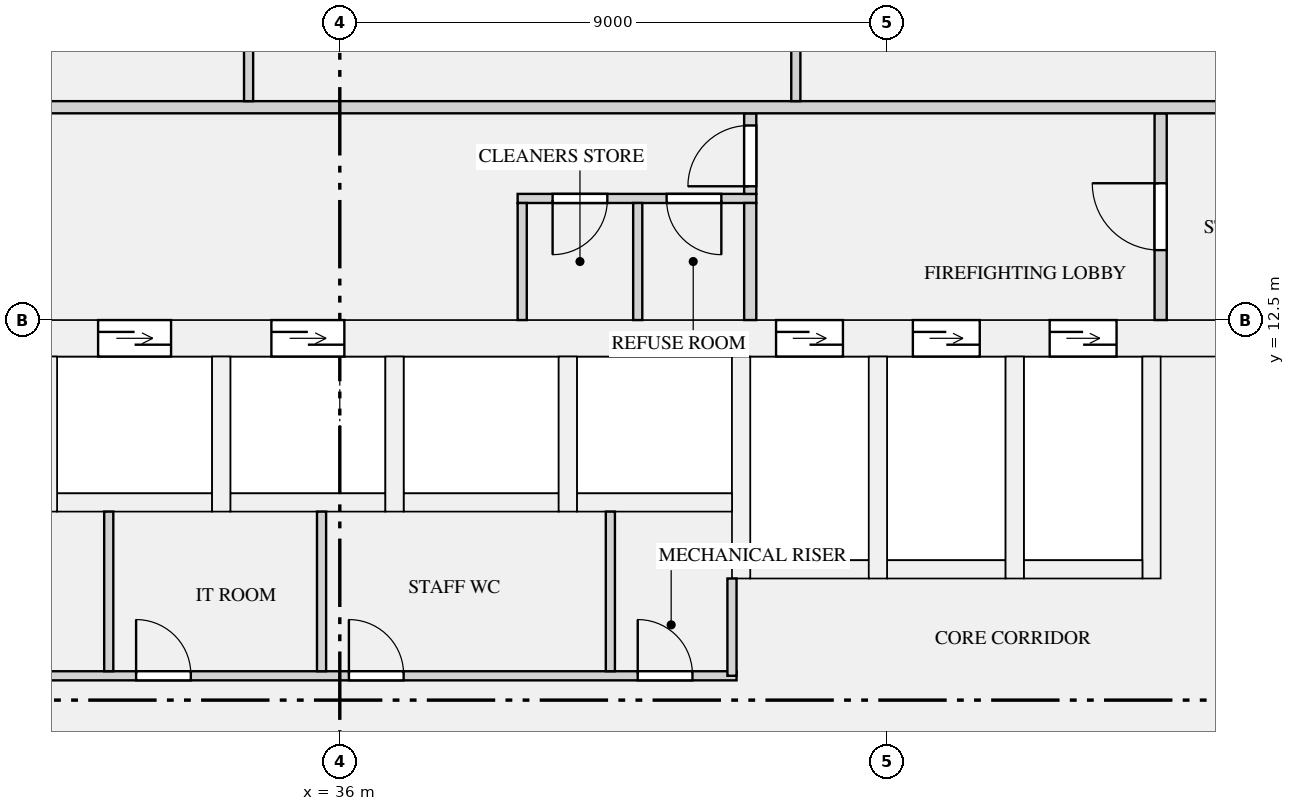
"""IFC4 building model, lengths in metres.
Left out: names, types, materials, properties, quantities, classifications, styles, units other than length and angle.
Written with IfcOpenShell. Run it as: python <this file> out.ifc"""

import sys

from ifc_helpers import new_model, si_unit, direction, frame, frame_2d, origin, place, context, subcontext, project, spatial, rectangle, extrude, element, fill, save


model = new_model("IFC4")
c1 = context("Model", 3, precision=1e-05, world=origin(), true_north=direction((0.0, 1.0)))
c2 = subcontext(c1, "Body", "Model", "MODEL_VIEW")
j1 = project(units=[si_unit("LENGTHUNIT", "METRE"), si_unit("PLANEANGLEUNIT", "RADIAN")], contexts=[c1])
p1 = place(None, origin())
s1 = spatial("IfcSite", under=j1, at=p1, CompositionType="ELEMENT")
p2 = place(p1, origin())
s2 = spatial("IfcBuilding", under=s1, at=p2, CompositionType="ELEMENT")
p3 = place(p2, frame((0.0, 0.0, 28.95)))
s3 = spatial("IfcBuildingStorey", under=s2, at=p3, CompositionType="ELEMENT", Elevation=28.95)
p4 = place(p3, frame((19.0, 12.2, 0.0), z_axis=(0.0, 0.0, 1.0), x_axis=(1.0, 0.0, 0.0)))
e1 = element("IfcWall", 1, at=p4, inside=s3, PredefinedType="SHEAR", context=c2, shape_type="SweptSolid", body=[
    extrude(rectangle(XDim=34.0, YDim=0.6, at=frame_2d((17.0, 0.0))), origin(), (0.0, 0.0, 1.0), 3.15),
])
p5 = place(p4, frame((4.475, 0.0, 0.0)))
e2 = element("IfcOpeningElement", 2, at=p5, cuts=e1, PredefinedType="OPENING", context=c2, shape_type="SweptSolid", body=[
    extrude(rectangle(XDim=1.2, YDim=2.1, at=frame_2d((0.6, 1.05))), frame((0.0, 0.31, 0.0), z_axis=(0.0, -1.0, 0.0), x_axis=(1.0, 0.0, 0.0)), (0.0, 0.0, 1.0), 0.62),
])
p6 = place(p4, frame((7.325, 0.0, 0.0)))
e3 = element("IfcOpeningElement", 3, at=p6, cuts=e1, PredefinedType="OPENING", context=c2, shape_type="SweptSolid", body=[
    extrude(rectangle(XDim=1.2, YDim=2.1, at=frame_2d((0.6, 1.05))), frame((0.0, 0.31, 0.0), z_axis=(0.0, -1.0, 0.0), x_axis=(1.0, 0.0, 0.0)), (0.0, 0.0, 1.0), 0.62),
])
p7 = place(p4, frame((10.175, 0.0, 0.0)))
e4 = element("IfcOpeningElement", 4, at=p7, cuts=e1, PredefinedType="OPENING", context=c2, shape_type="SweptSolid", body=[
    extrude(rectangle(XDim=1.2, YDim=2.1, at=frame_2d((0.6, 1.05))), frame((0.0, 0.31, 0.0), z_axis=(0.0, -1.0, 0.0), x_axis=(1.0, 0.0, 0.0)), (0.0, 0.0, 1.0), 0.62),
])
p8 = place(p4, frame((13.025, 0.0, 0.0)))
e5 = element("IfcOpeningElement", 5, at=p8, cuts=e1, PredefinedType="OPENING", context=c2, shape_type="SweptSolid", body=[
    extrude(rectangle(XDim=1.2, YDim=2.1, at=frame_2d((0.6, 1.05))), frame((0.0, 0.31, 0.0), z_axis=(0.0, -1.0, 0.0), x_axis=(1.0, 0.0, 0.0)), (0.0, 0.0, 1.0), 0.62),
])
p9 = place(p4, frame((15.875, 0.0, 0.0)))
e6 = element("IfcOpeningElement", 6, at=p9, cuts=e1, PredefinedType="OPENING", context=c2, shape_type="SweptSolid", body=[
    extrude(rectangle(XDim=1.2, YDim=2.1, at=frame_2d((0.6, 1.05))), frame((0.0, 0.31, 0.0), z_axis=(0.0, -1.0, 0.0), x_axis=(1.0, 0.0, 0.0)), (0.0, 0.0, 1.0), 0.62),
])
p10 = place(p4, frame((24.175, 0.0, 0.0)))
e7 = element("IfcOpeningElement", 7, at=p10, cuts=e1, PredefinedType="OPENING", context=c2, shape_type="SweptSolid", body=[
    extrude(rectangle(XDim=1.1, YDim=2.1, at=frame_2d((0.55, 1.05))), frame((0.0, 0.31, 0.0), z_axis=(0.0, -1.0, 0.0), x_axis=(1.0, 0.0, 0.0)), (0.0, 0.0, 1.0), 0.62),
])
p11 = place(p4, frame((26.425, 0.0, 0.0)))
e8 = element("IfcOpeningElement", 8, at=p11, cuts=e1, PredefinedType="OPENING", context=c2, shape_type="SweptSolid", body=[
    extrude(rectangle(XDim=1.1, YDim=2.1, at=frame_2d((0.55, 1.05))), frame((0.0, 0.31, 0.0), z_axis=(0.0, -1.0, 0.0), x_axis=(1.0, 0.0, 0.0)), (0.0, 0.0, 1.0), 0.62),
])
p12 = place(p4, frame((28.675, 0.0, 0.0)))
e9 = element("IfcOpeningElement", 9, at=p12, cuts=e1, PredefinedType="OPENING", context=c2, shape_type="SweptSolid", body=[
    extrude(rectangle(XDim=1.1, YDim=2.1, at=frame_2d((0.55, 1.05))), frame((0.0, 0.31, 0.0), z_axis=(0.0, -1.0, 0.0), x_axis=(1.0, 0.0, 0.0)), (0.0, 0.0, 1.0), 0.62),
])
p13 = place(p4, frame((1.15, 0.0, 0.0)))
e10 = element("IfcOpeningElement", 10, at=p13, cuts=e1, PredefinedType="OPENING", context=c2, shape_type="SweptSolid", body=[
    extrude(rectangle(XDim=1.2, YDim=2.1, at=frame_2d((0.6, 1.05))), frame((0.0, 0.31, 0.0), z_axis=(0.0, -1.0, 0.0), x_axis=(1.0, 0.0, 0.0)), (0.0, 0.0, 1.0), 0.62),
])
p14 = place(p4, frame((31.65, 0.0, 0.0)))
e11 = element("IfcOpeningElement", 11, at=p14, cuts=e1, PredefinedType="OPENING", context=c2, shape_type="SweptSolid", body=[
    extrude(rectangle(XDim=1.2, YDim=2.1, at=frame_2d((0.6, 1.05))), frame((0.0, 0.31, 0.0), z_axis=(0.0, -1.0, 0.0), x_axis=(1.0, 0.0, 0.0)), (0.0, 0.0, 1.0), 0.62),
])
for number, where, z_axis, x_axis in (
    (12, (31.35, 9.5, 0.0), (0.0, 0.0, 1.0), (1.0, 0.0, 0.0)),
    (13, (31.2, 9.35, 0.0), (0.0, 0.0, 1.0), (0.0, 1.0, 0.0)),
):
    element("IfcWall", number, at=place(p3, frame(where, z_axis=z_axis, x_axis=x_axis)), inside=s3, PredefinedType="SHEAR", context=c2, shape_type="SweptSolid", body=[
        extrude(rectangle(XDim=2.55, YDim=0.3, at=frame_2d((1.275, 0.0))), origin(), (0.0, 0.0, 1.0), 3.15),
    ])
p15 = place(p3, frame((34.2, 9.5, 0.0), z_axis=(0.0, 0.0, 1.0), x_axis=(1.0, 0.0, 0.0)))
e14 = element("IfcWall", 14, at=p15, inside=s3, PredefinedType="SHEAR", context=c2, shape_type="SweptSolid", body=[
    extrude(rectangle(XDim=2.55, YDim=0.3, at=frame_2d((1.275, 0.0))), origin(), (0.0, 0.0, 1.0), 3.15),
])
p16 = place(p3, frame((34.05, 9.35, 0.0), z_axis=(0.0, 0.0, 1.0), x_axis=(0.0, 1.0, 0.0)))
e15 = element("IfcWall", 15, at=p16, inside=s3, PredefinedType="SHEAR", context=c2, shape_type="SweptSolid", body=[
    extrude(rectangle(XDim=2.55, YDim=0.3, at=frame_2d((1.275, 0.0))), origin(), (0.0, 0.0, 1.0), 3.15),
])
p17 = place(p3, frame((37.05, 9.5, 0.0), z_axis=(0.0, 0.0, 1.0), x_axis=(1.0, 0.0, 0.0)))
e16 = element("IfcWall", 16, at=p17, inside=s3, PredefinedType="SHEAR", context=c2, shape_type="SweptSolid", body=[
    extrude(rectangle(XDim=2.55, YDim=0.3, at=frame_2d((1.275, 0.0))), origin(), (0.0, 0.0, 1.0), 3.15),
])
p18 = place(p3, frame((36.9, 9.35, 0.0), z_axis=(0.0, 0.0, 1.0), x_axis=(0.0, 1.0, 0.0)))
e17 = element("IfcWall", 17, at=p18, inside=s3, PredefinedType="SHEAR", context=c2, shape_type="SweptSolid", body=[
    extrude(rectangle(XDim=2.55, YDim=0.3, at=frame_2d((1.275, 0.0))), origin(), (0.0, 0.0, 1.0), 3.15),
])
p19 = place(p3, frame((39.9, 9.5, 0.0), z_axis=(0.0, 0.0, 1.0), x_axis=(1.0, 0.0, 0.0)))
e18 = element("IfcWall", 18, at=p19, inside=s3, PredefinedType="SHEAR", context=c2, shape_type="SweptSolid", body=[
    extrude(rectangle(XDim=2.55, YDim=0.3, at=frame_2d((1.275, 0.0))), origin(), (0.0, 0.0, 1.0), 3.15),
])
p20 = place(p3, frame((39.75, 9.35, 0.0), z_axis=(0.0, 0.0, 1.0), x_axis=(0.0, 1.0, 0.0)))
e19 = element("IfcWall", 19, at=p20, inside=s3, PredefinedType="SHEAR", context=c2, shape_type="SweptSolid", body=[
    extrude(rectangle(XDim=2.55, YDim=0.3, at=frame_2d((1.275, 0.0))), origin(), (0.0, 0.0, 1.0), 3.15),
])
p21 = place(p3, frame((42.75, 8.4, 0.0), z_axis=(0.0, 0.0, 1.0), x_axis=(1.0, 0.0, 0.0)))
e20 = element("IfcWall", 20, at=p21, inside=s3, PredefinedType="SHEAR", context=c2, shape_type="SweptSolid", body=[
    extrude(rectangle(XDim=1.95, YDim=0.3, at=frame_2d((0.975, 0.0))), origin(), (0.0, 0.0, 1.0), 3.15),
])
p22 = place(p3, frame((42.6, 8.25, 0.0), z_axis=(0.0, 0.0, 1.0), x_axis=(0.0, 1.0, 0.0)))
e21 = element("IfcWall", 21, at=p22, inside=s3, PredefinedType="SHEAR", context=c2, shape_type="SweptSolid", body=[
    extrude(rectangle(XDim=3.65, YDim=0.3, at=frame_2d((1.825, 0.0))), origin(), (0.0, 0.0, 1.0), 3.15),
])
p23 = place(p3, frame((45.0, 8.4, 0.0), z_axis=(0.0, 0.0, 1.0), x_axis=(1.0, 0.0, 0.0)))
e22 = element("IfcWall", 22, at=p23, inside=s3, PredefinedType="SHEAR", context=c2, shape_type="SweptSolid", body=[
    extrude(rectangle(XDim=1.95, YDim=0.3, at=frame_2d((0.975, 0.0))), origin(), (0.0, 0.0, 1.0), 3.15),
])
p24 = place(p3, frame((44.85, 8.25, 0.0), z_axis=(0.0, 0.0, 1.0), x_axis=(0.0, 1.0, 0.0)))
e23 = element("IfcWall", 23, at=p24, inside=s3, PredefinedType="SHEAR", context=c2, shape_type="SweptSolid", body=[
    extrude(rectangle(XDim=3.65, YDim=0.3, at=frame_2d((1.825, 0.0))), origin(), (0.0, 0.0, 1.0), 3.15),
])
p25 = place(p3, frame((47.25, 8.4, 0.0), z_axis=(0.0, 0.0, 1.0), x_axis=(1.0, 0.0, 0.0)))
e24 = element("IfcWall", 24, at=p25, inside=s3, PredefinedType="SHEAR", context=c2, shape_type="SweptSolid", body=[
    extrude(rectangle(XDim=1.95, YDim=0.3, at=frame_2d((0.975, 0.0))), origin(), (0.0, 0.0, 1.0), 3.15),
])
for number, where, z_axis, x_axis in (
    (25, (47.1, 8.25, 0.0), (0.0, 0.0, 1.0), (0.0, 1.0, 0.0)),
    (26, (49.35, 8.25, 0.0), (0.0, 0.0, 1.0), (0.0, 1.0, 0.0)),
):
    element("IfcWall", number, at=place(p3, frame(where, z_axis=z_axis, x_axis=x_axis)), inside=s3, PredefinedType="SHEAR", context=c2, shape_type="SweptSolid", body=[
        extrude(rectangle(XDim=3.65, YDim=0.3, at=frame_2d((1.825, 0.0))), origin(), (0.0, 0.0, 1.0), 3.15),
    ])
p26 = place(p3, frame((22.125, 6.65, 0.0), z_axis=(0.0, 0.0, 1.0), x_axis=(1.0, 0.0, 0.0)))
e27 = element("IfcWall", 27, at=p26, inside=s3, PredefinedType="PARTITIONING", context=c2, shape_type="SweptSolid", body=[
    extrude(rectangle(XDim=20.4, YDim=0.15, at=frame_2d((10.2, 0.0))), origin(), (0.0, 0.0, 1.0), 2.83),
])
p27 = place(p26, frame((0.525, 0.0, 0.0)))
e28 = element("IfcOpeningElement", 28, at=p27, cuts=e27, PredefinedType="OPENING", context=c2, shape_type="SweptSolid", body=[
    extrude(rectangle(XDim=0.9, YDim=2.1, at=frame_2d((0.45, 1.05))), frame((0.0, 0.085, 0.0), z_axis=(0.0, -1.0, 0.0), x_axis=(1.0, 0.0, 0.0)), (0.0, 0.0, 1.0), 0.17),
])
p28 = place(p26, frame((5.025, 0.0, 0.0)))
e29 = element("IfcOpeningElement", 29, at=p28, cuts=e27, PredefinedType="OPENING", context=c2, shape_type="SweptSolid", body=[
    extrude(rectangle(XDim=0.9, YDim=2.1, at=frame_2d((0.45, 1.05))), frame((0.0, 0.085, 0.0), z_axis=(0.0, -1.0, 0.0), x_axis=(1.0, 0.0, 0.0)), (0.0, 0.0, 1.0), 0.17),
])
p29 = place(p26, frame((10.525, 0.0, 0.0)))
e30 = element("IfcOpeningElement", 30, at=p29, cuts=e27, PredefinedType="OPENING", context=c2, shape_type="SweptSolid", body=[
    extrude(rectangle(XDim=0.9, YDim=2.1, at=frame_2d((0.45, 1.05))), frame((0.0, 0.085, 0.0), z_axis=(0.0, -1.0, 0.0), x_axis=(1.0, 0.0, 0.0)), (0.0, 0.0, 1.0), 0.17),
])
p30 = place(p26, frame((14.025, 0.0, 0.0)))
e31 = element("IfcOpeningElement", 31, at=p30, cuts=e27, PredefinedType="OPENING", context=c2, shape_type="SweptSolid", body=[
    extrude(rectangle(XDim=0.9, YDim=2.1, at=frame_2d((0.45, 1.05))), frame((0.0, 0.085, 0.0), z_axis=(0.0, -1.0, 0.0), x_axis=(1.0, 0.0, 0.0)), (0.0, 0.0, 1.0), 0.17),
])
p31 = place(p26, frame((18.775, 0.0, 0.0)))
e32 = element("IfcOpeningElement", 32, at=p31, cuts=e27, PredefinedType="OPENING", context=c2, shape_type="SweptSolid", body=[
    extrude(rectangle(XDim=0.9, YDim=2.1, at=frame_2d((0.45, 1.05))), frame((0.0, 0.085, 0.0), z_axis=(0.0, -1.0, 0.0), x_axis=(1.0, 0.0, 0.0)), (0.0, 0.0, 1.0), 0.17),
])
p32 = place(p3, frame((38.925, 14.5, 0.0), z_axis=(0.0, 0.0, 1.0), x_axis=(1.0, 0.0, 0.0)))
e33 = element("IfcWall", 33, at=p32, inside=s3, PredefinedType="PARTITIONING", context=c2, shape_type="SweptSolid", body=[
    extrude(rectangle(XDim=3.925, YDim=0.15, at=frame_2d((1.962, 0.0))), origin(), (0.0, 0.0, 1.0), 2.83),
])
p33 = place(p32, frame((0.575, 0.0, 0.0)))
e34 = element("IfcOpeningElement", 34, at=p33, cuts=e33, PredefinedType="OPENING", context=c2, shape_type="SweptSolid", body=[
    extrude(rectangle(XDim=0.9, YDim=2.1, at=frame_2d((0.45, 1.05))), frame((0.0, 0.085, 0.0), z_axis=(0.0, -1.0, 0.0), x_axis=(1.0, 0.0, 0.0)), (0.0, 0.0, 1.0), 0.17),
])
p34 = place(p32, frame((2.45, 0.0, 0.0)))
e35 = element("IfcOpeningElement", 35, at=p34, cuts=e33, PredefinedType="OPENING", context=c2, shape_type="SweptSolid", body=[
    extrude(rectangle(XDim=0.9, YDim=2.1, at=frame_2d((0.45, 1.05))), frame((0.0, 0.085, 0.0), z_axis=(0.0, -1.0, 0.0), x_axis=(1.0, 0.0, 0.0)), (0.0, 0.0, 1.0), 0.17),
])
p35 = place(p3, frame((42.45, 6.65, 0.0), z_axis=(0.0, 0.0, 1.0), x_axis=(0.0, 1.0, 0.0)))
e36 = element("IfcWall", 36, at=p35, inside=s3, PredefinedType="PARTITIONING", context=c2, shape_type="SweptSolid", body=[
    extrude(rectangle(XDim=1.6, YDim=0.15, at=frame_2d((0.8, 0.0))), origin(), (0.0, 0.0, 1.0), 2.83),
])
for number, where, z_axis, x_axis in (
    (37, (32.2, 6.725, 0.0), (0.0, 0.0, 1.0), (0.0, 1.0, 0.0)),
    (38, (35.7, 6.725, 0.0), (0.0, 0.0, 1.0), (0.0, 1.0, 0.0)),
    (39, (40.45, 6.725, 0.0), (0.0, 0.0, 1.0), (0.0, 1.0, 0.0)),
):
    element("IfcWall", number, at=place(p3, frame(where, z_axis=z_axis, x_axis=x_axis)), inside=s3, PredefinedType="PARTITIONING", context=c2, shape_type="SweptSolid", body=[
        extrude(rectangle(XDim=2.625, YDim=0.15, at=frame_2d((1.312, 0.0))), origin(), (0.0, 0.0, 1.0), 2.83),
    ])
for number, where, z_axis, x_axis in (
    (40, (39.0, 12.5, 0.0), (0.0, 0.0, 1.0), (0.0, 1.0, 0.0)),
    (41, (40.9, 12.5, 0.0), (0.0, 0.0, 1.0), (0.0, 1.0, 0.0)),
):
    element("IfcWall", number, at=place(p3, frame(where, z_axis=z_axis, x_axis=x_axis)), inside=s3, PredefinedType="PARTITIONING", context=c2, shape_type="SweptSolid", body=[
        extrude(rectangle(XDim=1.925, YDim=0.15, at=frame_2d((0.962, 0.0))), origin(), (0.0, 0.0, 1.0), 2.83),
    ])
p36 = place(p3, frame((42.75, 12.5, 0.0), z_axis=(0.0, 0.0, 1.0), x_axis=(0.0, 1.0, 0.0)))
e42 = element("IfcWall", 42, at=p36, inside=s3, PredefinedType="PARTITIONING", context=c2, shape_type="SweptSolid", body=[
    extrude(rectangle(XDim=1.925, YDim=0.2, at=frame_2d((0.962, 0.0))), origin(), (0.0, 0.0, 1.0), 2.83),
])
p37 = place(p3, frame((49.5, 12.5, 0.0), z_axis=(0.0, 0.0, 1.0), x_axis=(0.0, 1.0, 0.0)))
e43 = element("IfcWall", 43, at=p37, inside=s3, PredefinedType="PARTITIONING", context=c2, shape_type="SweptSolid", body=[
    extrude(rectangle(XDim=3.4, YDim=0.2, at=frame_2d((1.7, 0.0))), origin(), (0.0, 0.0, 1.0), 2.83),
])
p38 = place(p37, frame((1.15, 0.0, 0.0)))
e44 = element("IfcOpeningElement", 44, at=p38, cuts=e43, PredefinedType="OPENING", context=c2, shape_type="SweptSolid", body=[
    extrude(rectangle(XDim=1.1, YDim=2.1, at=frame_2d((0.55, 1.05))), frame((0.0, 0.11, 0.0), z_axis=(0.0, -1.0, 0.0), x_axis=(1.0, 0.0, 0.0)), (0.0, 0.0, 1.0), 0.22),
])
p39 = place(p3, frame((42.75, 14.575, 0.0), z_axis=(0.0, 0.0, 1.0), x_axis=(0.0, 1.0, 0.0)))
e45 = element("IfcWall", 45, at=p39, inside=s3, PredefinedType="PARTITIONING", context=c2, shape_type="SweptSolid", body=[
    extrude(rectangle(XDim=1.325, YDim=0.2, at=frame_2d((0.663, 0.0))), origin(), (0.0, 0.0, 1.0), 2.83),
])
p40 = place(p39, frame((0.125, 0.0, 0.0)))
e46 = element("IfcOpeningElement", 46, at=p40, cuts=e45, PredefinedType="OPENING", context=c2, shape_type="SweptSolid", body=[
    extrude(rectangle(XDim=1.0, YDim=2.1, at=frame_2d((0.5, 1.05))), frame((0.0, 0.11, 0.0), z_axis=(0.0, -1.0, 0.0), x_axis=(1.0, 0.0, 0.0)), (0.0, 0.0, 1.0), 0.22),
])
p41 = place(p3, frame((17.9, 16.0, 0.0), z_axis=(0.0, 0.0, 1.0), x_axis=(1.0, 0.0, 0.0)))
e47 = element("IfcWall", 47, at=p41, inside=s3, PredefinedType="PARTITIONING", context=c2, shape_type="SweptSolid", body=[
    extrude(rectangle(XDim=36.2, YDim=0.2, at=frame_2d((18.1, 0.0))), origin(), (0.0, 0.0, 1.0), 2.83),
])
p42 = place(p41, frame((0.9, 0.0, 0.0)))
e48 = element("IfcOpeningElement", 48, at=p42, cuts=e47, PredefinedType="OPENING", context=c2, shape_type="SweptSolid", body=[
    extrude(rectangle(XDim=1.4, YDim=2.1, at=frame_2d((0.7, 1.05))), frame((0.0, 0.11, 0.0), z_axis=(0.0, -1.0, 0.0), x_axis=(1.0, 0.0, 0.0)), (0.0, 0.0, 1.0), 0.22),
])
p43 = place(p41, frame((33.9, 0.0, 0.0)))
e49 = element("IfcOpeningElement", 49, at=p43, cuts=e47, PredefinedType="OPENING", context=c2, shape_type="SweptSolid", body=[
    extrude(rectangle(XDim=1.4, YDim=2.1, at=frame_2d((0.7, 1.05))), frame((0.0, 0.11, 0.0), z_axis=(0.0, -1.0, 0.0), x_axis=(1.0, 0.0, 0.0)), (0.0, 0.0, 1.0), 0.22),
])
for number, where, z_axis, x_axis in (
    (50, (34.5, 16.1, 0.0), (0.0, 0.0, 1.0), (0.0, 1.0, 0.0)),
    (51, (43.5, 16.1, 0.0), (0.0, 0.0, 1.0), (0.0, 1.0, 0.0)),
):
    element("IfcWall", number, at=place(p3, frame(where, z_axis=z_axis, x_axis=x_axis)), inside=s3, PredefinedType="PARTITIONING", context=c2, shape_type="SweptSolid", body=[
        extrude(rectangle(XDim=4.825, YDim=0.15, at=frame_2d((2.413, 0.0))), origin(), (0.0, 0.0, 1.0), 2.83),
    ])
p44 = place(p8, origin())
e52 = element("IfcDoor", 52, at=p44, inside=s3, OperationType="DOUBLE_DOOR_SLIDING", PredefinedType="DOOR", context=c2, shape_type="SweptSolid", body=[
    extrude(rectangle(XDim=1.2, YDim=2.1, at=frame_2d((0.6, 1.05))), frame((0.0, 0.025, 0.0), z_axis=(0.0, -1.0, 0.0), x_axis=(1.0, 0.0, 0.0)), (0.0, 0.0, 1.0), 0.05),
])
fill(e5, e52)
p45 = place(p9, origin())
e53 = element("IfcDoor", 53, at=p45, inside=s3, OperationType="DOUBLE_DOOR_SLIDING", PredefinedType="DOOR", context=c2, shape_type="SweptSolid", body=[
    extrude(rectangle(XDim=1.2, YDim=2.1, at=frame_2d((0.6, 1.05))), frame((0.0, 0.025, 0.0), z_axis=(0.0, -1.0, 0.0), x_axis=(1.0, 0.0, 0.0)), (0.0, 0.0, 1.0), 0.05),
])
fill(e6, e53)
p46 = place(p10, origin())
e54 = element("IfcDoor", 54, at=p46, inside=s3, OperationType="DOUBLE_DOOR_SLIDING", PredefinedType="DOOR", context=c2, shape_type="SweptSolid", body=[
    extrude(rectangle(XDim=1.1, YDim=2.1, at=frame_2d((0.55, 1.05))), frame((0.0, 0.025, 0.0), z_axis=(0.0, -1.0, 0.0), x_axis=(1.0, 0.0, 0.0)), (0.0, 0.0, 1.0), 0.05),
])
fill(e7, e54)
p47 = place(p11, origin())
e55 = element("IfcDoor", 55, at=p47, inside=s3, OperationType="DOUBLE_DOOR_SLIDING", PredefinedType="DOOR", context=c2, shape_type="SweptSolid", body=[
    extrude(rectangle(XDim=1.1, YDim=2.1, at=frame_2d((0.55, 1.05))), frame((0.0, 0.025, 0.0), z_axis=(0.0, -1.0, 0.0), x_axis=(1.0, 0.0, 0.0)), (0.0, 0.0, 1.0), 0.05),
])
fill(e8, e55)
p48 = place(p12, origin())
e56 = element("IfcDoor", 56, at=p48, inside=s3, OperationType="DOUBLE_DOOR_SLIDING", PredefinedType="DOOR", context=c2, shape_type="SweptSolid", body=[
    extrude(rectangle(XDim=1.1, YDim=2.1, at=frame_2d((0.55, 1.05))), frame((0.0, 0.025, 0.0), z_axis=(0.0, -1.0, 0.0), x_axis=(1.0, 0.0, 0.0)), (0.0, 0.0, 1.0), 0.05),
])
fill(e9, e56)
p49 = place(p29, origin())
e57 = element("IfcDoor", 57, at=p49, inside=s3, OperationType="SINGLE_SWING_LEFT", PredefinedType="DOOR", context=c2, shape_type="SweptSolid", body=[
    extrude(rectangle(XDim=0.9, YDim=2.1, at=frame_2d((0.45, 1.05))), frame((0.0, 0.025, 0.0), z_axis=(0.0, -1.0, 0.0), x_axis=(1.0, 0.0, 0.0)), (0.0, 0.0, 1.0), 0.05),
])
fill(e30, e57)
p50 = place(p30, origin())
e58 = element("IfcDoor", 58, at=p50, inside=s3, OperationType="SINGLE_SWING_LEFT", PredefinedType="DOOR", context=c2, shape_type="SweptSolid", body=[
    extrude(rectangle(XDim=0.9, YDim=2.1, at=frame_2d((0.45, 1.05))), frame((0.0, 0.025, 0.0), z_axis=(0.0, -1.0, 0.0), x_axis=(1.0, 0.0, 0.0)), (0.0, 0.0, 1.0), 0.05),
])
fill(e31, e58)
p51 = place(p31, origin())
e59 = element("IfcDoor", 59, at=p51, inside=s3, OperationType="SINGLE_SWING_LEFT", PredefinedType="DOOR", context=c2, shape_type="SweptSolid", body=[
    extrude(rectangle(XDim=0.9, YDim=2.1, at=frame_2d((0.45, 1.05))), frame((0.0, 0.025, 0.0), z_axis=(0.0, -1.0, 0.0), x_axis=(1.0, 0.0, 0.0)), (0.0, 0.0, 1.0), 0.05),
])
fill(e32, e59)
p52 = place(p33, frame((0.9, 0.0, 0.0), z_axis=(0.0, 0.0, 1.0), x_axis=(-1.0, 0.0, 0.0)))
e60 = element("IfcDoor", 60, at=p52, inside=s3, OperationType="SINGLE_SWING_RIGHT", PredefinedType="DOOR", context=c2, shape_type="SweptSolid", body=[
    extrude(rectangle(XDim=0.9, YDim=2.1, at=frame_2d((0.45, 1.05))), frame((0.0, 0.025, 0.0), z_axis=(0.0, -1.0, 0.0), x_axis=(1.0, 0.0, 0.0)), (0.0, 0.0, 1.0), 0.05),
])
fill(e34, e60)
p53 = place(p34, frame((0.9, 0.0, 0.0), z_axis=(0.0, 0.0, 1.0), x_axis=(-1.0, 0.0, 0.0)))
e61 = element("IfcDoor", 61, at=p53, inside=s3, OperationType="SINGLE_SWING_LEFT", PredefinedType="DOOR", context=c2, shape_type="SweptSolid", body=[
    extrude(rectangle(XDim=0.9, YDim=2.1, at=frame_2d((0.45, 1.05))), frame((0.0, 0.025, 0.0), z_axis=(0.0, -1.0, 0.0), x_axis=(1.0, 0.0, 0.0)), (0.0, 0.0, 1.0), 0.05),
])
fill(e35, e61)
p54 = place(p40, origin())
e62 = element("IfcDoor", 62, at=p54, inside=s3, OperationType="SINGLE_SWING_LEFT", PredefinedType="DOOR", context=c2, shape_type="SweptSolid", body=[
    extrude(rectangle(XDim=1.0, YDim=2.1, at=frame_2d((0.5, 1.05))), frame((0.0, 0.025, 0.0), z_axis=(0.0, -1.0, 0.0), x_axis=(1.0, 0.0, 0.0)), (0.0, 0.0, 1.0), 0.05),
])
fill(e46, e62)
p55 = place(p38, origin())
e63 = element("IfcDoor", 63, at=p55, inside=s3, OperationType="SINGLE_SWING_RIGHT", PredefinedType="DOOR", context=c2, shape_type="SweptSolid", body=[
    extrude(rectangle(XDim=1.1, YDim=2.1, at=frame_2d((0.55, 1.05))), frame((0.0, 0.025, 0.0), z_axis=(0.0, -1.0, 0.0), x_axis=(1.0, 0.0, 0.0)), (0.0, 0.0, 1.0), 0.05),
])
fill(e44, e63)
save(model, sys.argv[1])
